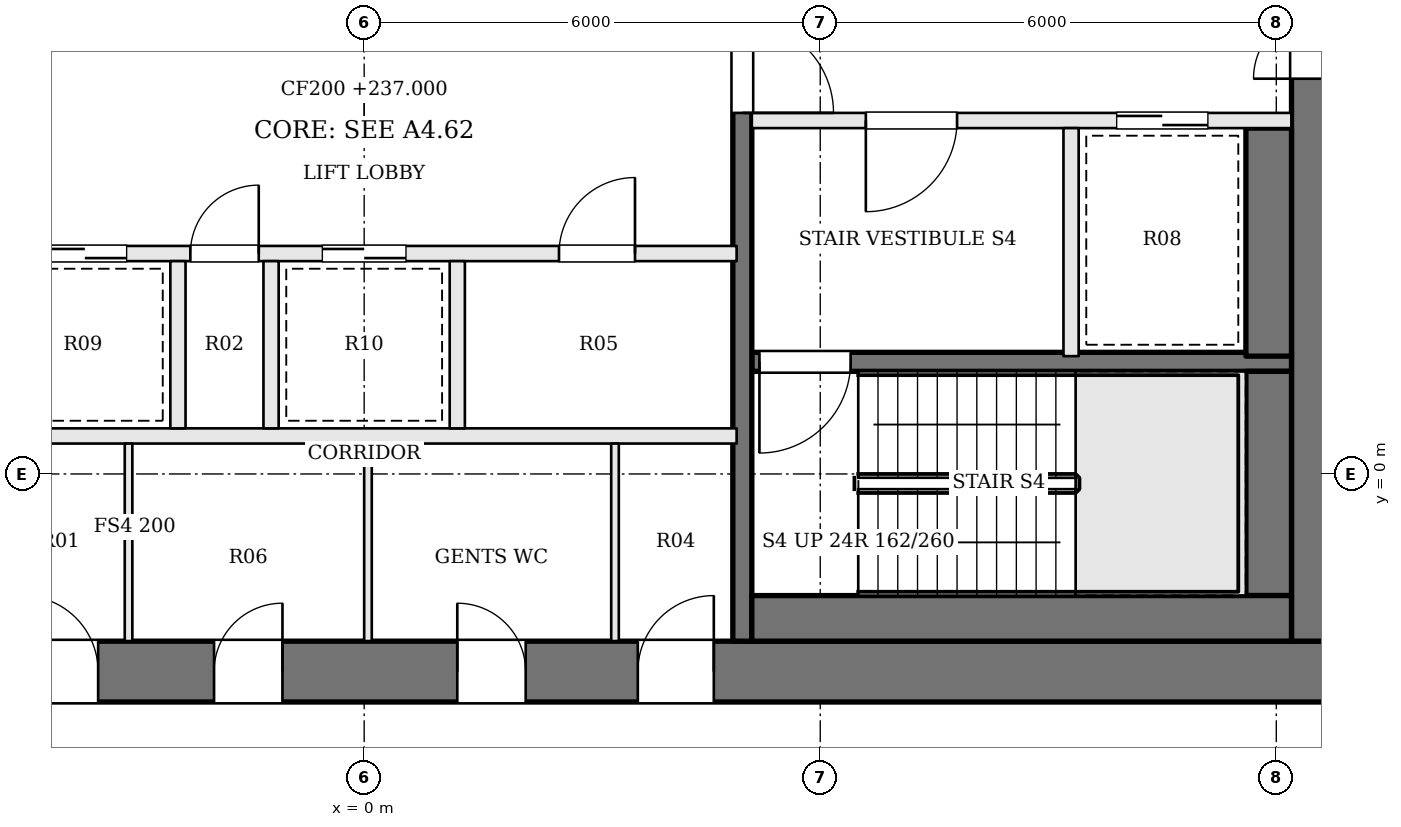
"""IFC4 building model, lengths in metres.
Left out: names, types, materials, properties, quantities, classifications, styles, units other than length and angle.
Written with IfcOpenShell. Run it as: python <this file> out.ifc"""

import sys

from ifc_helpers import new_model, si_unit, direction, frame, frame_2d, origin, place, context, subcontext, project, spatial, rectangle, extrude, element, fill, save


model = new_model("IFC4")
c1 = context("Model", 3, precision=1e-05, world=origin(), true_north=direction((0.0, 1.0)))
c2 = subcontext(c1, "Body", "Model", "MODEL_VIEW")
j1 = project(units=[si_unit("LENGTHUNIT", "METRE"), si_unit("PLANEANGLEUNIT", "RADIAN")], contexts=[c1])
p1 = place(None, origin())
s1 = spatial("IfcSite", under=j1, at=p1, CompositionType="ELEMENT")
p2 = place(p1, origin())
s2 = spatial("IfcBuilding", under=s1, at=p2, CompositionType="ELEMENT")
p3 = place(p2, frame((0.0, 0.0, 237.0)))
s3 = spatial("IfcBuildingStorey", under=s2, at=p3, CompositionType="ELEMENT", Elevation=237.0)
p4 = place(p3, frame((-13.0, -2.6, 0.0), z_axis=(0.0, 0.0, 1.0), x_axis=(1.0, 0.0, 0.0)))
e1 = element("IfcWall", 1, at=p4, inside=s3, PredefinedType="SHEAR", context=c2, shape_type="SweptSolid", body=[
    extrude(rectangle(XDim=26.0, YDim=0.8, at=frame_2d((13.0, 0.0))), origin(), (0.0, 0.0, 1.0), 3.9),
])
p5 = place(p4, frame((8.5, 0.0, 0.0)))
e2 = element("IfcOpeningElement", 2, at=p5, cuts=e1, PredefinedType="OPENING", context=c2, shape_type="SweptSolid", body=[
    extrude(rectangle(XDim=1.0, YDim=2.1, at=frame_2d((0.5, 1.05))), frame((0.0, 0.41, 0.0), z_axis=(0.0, -1.0, 0.0), x_axis=(1.0, 0.0, 0.0)), (0.0, 0.0, 1.0), 0.82),
])
p6 = place(p4, frame((11.025, 0.0, 0.0)))
e3 = element("IfcOpeningElement", 3, at=p6, cuts=e1, PredefinedType="OPENING", context=c2, shape_type="SweptSolid", body=[
    extrude(rectangle(XDim=0.9, YDim=2.1, at=frame_2d((0.45, 1.05))), frame((0.0, 0.41, 0.0), z_axis=(0.0, -1.0, 0.0), x_axis=(1.0, 0.0, 0.0)), (0.0, 0.0, 1.0), 0.82),
])
p7 = place(p4, frame((14.225, 0.0, 0.0)))
e4 = element("IfcOpeningElement", 4, at=p7, cuts=e1, PredefinedType="OPENING", context=c2, shape_type="SweptSolid", body=[
    extrude(rectangle(XDim=0.9, YDim=2.1, at=frame_2d((0.45, 1.05))), frame((0.0, 0.41, 0.0), z_axis=(0.0, -1.0, 0.0), x_axis=(1.0, 0.0, 0.0)), (0.0, 0.0, 1.0), 0.82),
])
p8 = place(p4, frame((16.6, 0.0, 0.0)))
e5 = element("IfcOpeningElement", 5, at=p8, cuts=e1, PredefinedType="OPENING", context=c2, shape_type="SweptSolid", body=[
    extrude(rectangle(XDim=1.0, YDim=2.1, at=frame_2d((0.5, 1.05))), frame((0.0, 0.41, 0.0), z_axis=(0.0, -1.0, 0.0), x_axis=(1.0, 0.0, 0.0)), (0.0, 0.0, 1.0), 0.82),
])
p9 = place(p3, frame((12.6, -2.2, 0.0), z_axis=(0.0, 0.0, 1.0), x_axis=(0.0, 1.0, 0.0)))
e6 = element("IfcWall", 6, at=p9, inside=s3, PredefinedType="SHEAR", context=c2, shape_type="SweptSolid", body=[
    extrude(rectangle(XDim=13.4, YDim=0.8, at=frame_2d((6.7, 0.0))), origin(), (0.0, 0.0, 1.0), 3.9),
])
p10 = place(p9, frame((7.4, 0.0, 0.0)))
e7 = element("IfcOpeningElement", 7, at=p10, cuts=e6, PredefinedType="OPENING", context=c2, shape_type="SweptSolid", body=[
    extrude(rectangle(XDim=1.8, YDim=2.1, at=frame_2d((0.9, 1.05))), frame((0.0, 0.41, 0.0), z_axis=(0.0, -1.0, 0.0), x_axis=(1.0, 0.0, 0.0)), (0.0, 0.0, 1.0), 0.82),
])
p11 = place(p3, frame((12.2, 4.65, 0.0), z_axis=(0.0, 0.0, 1.0), x_axis=(-1.0, 0.0, 0.0)))
e8 = element("IfcWall", 8, at=p11, inside=s3, PredefinedType="SOLIDWALL", context=c2, shape_type="SweptSolid", body=[
    extrude(rectangle(XDim=7.1, YDim=0.2, at=frame_2d((3.55, 0.0))), origin(), (0.0, 0.0, 1.0), 3.7),
])
p12 = place(p11, frame((4.4, 0.0, 0.0)))
e9 = element("IfcOpeningElement", 9, at=p12, cuts=e8, PredefinedType="OPENING", context=c2, shape_type="SweptSolid", body=[
    extrude(rectangle(XDim=1.2, YDim=2.1, at=frame_2d((0.6, 1.05))), frame((0.0, 0.11, 0.0), z_axis=(0.0, -1.0, 0.0), x_axis=(1.0, 0.0, 0.0)), (0.0, 0.0, 1.0), 0.22),
])
p13 = place(p11, frame((1.1, 0.0, 0.0)))
e10 = element("IfcOpeningElement", 10, at=p13, cuts=e8, PredefinedType="OPENING", context=c2, shape_type="SweptSolid", body=[
    extrude(rectangle(XDim=1.2, YDim=2.1, at=frame_2d((0.6, 1.05))), frame((0.0, 0.11, 0.0), z_axis=(0.0, -1.0, 0.0), x_axis=(1.0, 0.0, 0.0)), (0.0, 0.0, 1.0), 0.22),
])
p14 = place(p3, frame((12.2, 1.475, 0.0), z_axis=(0.0, 0.0, 1.0), x_axis=(-1.0, 0.0, 0.0)))
e11 = element("IfcWall", 11, at=p14, inside=s3, PredefinedType="SOLIDWALL", context=c2, shape_type="SweptSolid", body=[
    extrude(rectangle(XDim=7.1, YDim=0.25, at=frame_2d((3.55, 0.0))), origin(), (0.0, 0.0, 1.0), 3.7),
])
p15 = place(p14, frame((5.8, 0.0, 0.0)))
e12 = element("IfcOpeningElement", 12, at=p15, cuts=e11, PredefinedType="OPENING", context=c2, shape_type="SweptSolid", body=[
    extrude(rectangle(XDim=1.2, YDim=2.1, at=frame_2d((0.6, 1.05))), frame((0.0, 0.135, 0.0), z_axis=(0.0, -1.0, 0.0), x_axis=(1.0, 0.0, 0.0)), (0.0, 0.0, 1.0), 0.27),
])
p16 = place(p3, frame((9.3, 4.55, 0.0), z_axis=(0.0, 0.0, 1.0), x_axis=(0.0, -1.0, 0.0)))
e13 = element("IfcWall", 13, at=p16, inside=s3, PredefinedType="SOLIDWALL", context=c2, shape_type="SweptSolid", body=[
    extrude(rectangle(XDim=3.0, YDim=0.2, at=frame_2d((1.5, 0.0))), origin(), (0.0, 0.0, 1.0), 3.7),
])
p17 = place(p3, frame((4.975, 11.2, 0.0), z_axis=(0.0, 0.0, 1.0), x_axis=(0.0, -1.0, 0.0)))
e14 = element("IfcWall", 14, at=p17, inside=s3, PredefinedType="SOLIDWALL", context=c2, shape_type="SweptSolid", body=[
    extrude(rectangle(XDim=13.4, YDim=0.25, at=frame_2d((6.7, 0.0))), origin(), (0.0, 0.0, 1.0), 3.7),
])
p18 = place(p17, frame((5.25, 0.0, 0.0)))
e15 = element("IfcOpeningElement", 15, at=p18, cuts=e14, PredefinedType="OPENING", context=c2, shape_type="SweptSolid", body=[
    extrude(rectangle(XDim=1.2, YDim=2.1, at=frame_2d((0.6, 1.05))), frame((0.0, 0.135, 0.0), z_axis=(0.0, -1.0, 0.0), x_axis=(1.0, 0.0, 0.0)), (0.0, 0.0, 1.0), 0.27),
])
p19 = place(p3, frame((11.9, 4.55, 0.0), z_axis=(0.0, 0.0, 1.0), x_axis=(0.0, -1.0, 0.0)))
e16 = element("IfcWall", 16, at=p19, inside=s3, PredefinedType="SOLIDWALL", context=c2, shape_type="SweptSolid", body=[
    extrude(rectangle(XDim=3.0, YDim=0.6, at=frame_2d((1.5, 0.0))), origin(), (0.0, 0.0, 1.0), 3.7),
])
p20 = place(p3, frame((11.9, 1.35, 0.0), z_axis=(0.0, 0.0, 1.0), x_axis=(0.0, -1.0, 0.0)))
e17 = element("IfcWall", 17, at=p20, inside=s3, PredefinedType="SOLIDWALL", context=c2, shape_type="SweptSolid", body=[
    extrude(rectangle(XDim=2.95, YDim=0.6, at=frame_2d((1.475, 0.0))), origin(), (0.0, 0.0, 1.0), 3.7),
])
p21 = place(p3, frame((12.2, -1.9, 0.0), z_axis=(0.0, 0.0, 1.0), x_axis=(-1.0, 0.0, 0.0)))
e18 = element("IfcWall", 18, at=p21, inside=s3, PredefinedType="SOLIDWALL", context=c2, shape_type="SweptSolid", body=[
    extrude(rectangle(XDim=7.1, YDim=0.6, at=frame_2d((3.55, 0.0))), origin(), (0.0, 0.0, 1.0), 3.7),
])
p22 = place(p3, frame((-4.9, 0.5, 0.0), z_axis=(0.0, 0.0, 1.0), x_axis=(1.0, 0.0, 0.0)))
e19 = element("IfcWall", 19, at=p22, inside=s3, PredefinedType="SOLIDWALL", context=c2, shape_type="SweptSolid", body=[
    extrude(rectangle(XDim=9.8, YDim=0.2, at=frame_2d((4.9, 0.0))), origin(), (0.0, 0.0, 1.0), 3.7),
])
p23 = place(p3, frame((-4.9, 2.9, 0.0), z_axis=(0.0, 0.0, 1.0), x_axis=(1.0, 0.0, 0.0)))
e20 = element("IfcWall", 20, at=p23, inside=s3, PredefinedType="SOLIDWALL", context=c2, shape_type="SweptSolid", body=[
    extrude(rectangle(XDim=9.8, YDim=0.2, at=frame_2d((4.9, 0.0))), origin(), (0.0, 0.0, 1.0), 3.7),
])
p24 = place(p23, frame((0.675, 0.0, 0.0)))
e21 = element("IfcOpeningElement", 21, at=p24, cuts=e20, PredefinedType="OPENING", context=c2, shape_type="SweptSolid", body=[
    extrude(rectangle(XDim=1.1, YDim=2.1, at=frame_2d((0.55, 1.05))), frame((0.0, 0.11, 0.0), z_axis=(0.0, -1.0, 0.0), x_axis=(1.0, 0.0, 0.0)), (0.0, 0.0, 1.0), 0.22),
])
p25 = place(p23, frame((2.613, 0.0, 0.0)))
e22 = element("IfcOpeningElement", 22, at=p25, cuts=e20, PredefinedType="OPENING", context=c2, shape_type="SweptSolid", body=[
    extrude(rectangle(XDim=0.9, YDim=2.1, at=frame_2d((0.45, 1.05))), frame((0.0, 0.11, 0.0), z_axis=(0.0, -1.0, 0.0), x_axis=(1.0, 0.0, 0.0)), (0.0, 0.0, 1.0), 0.22),
])
p26 = place(p23, frame((4.35, 0.0, 0.0)))
e23 = element("IfcOpeningElement", 23, at=p26, cuts=e20, PredefinedType="OPENING", context=c2, shape_type="SweptSolid", body=[
    extrude(rectangle(XDim=1.1, YDim=2.1, at=frame_2d((0.55, 1.05))), frame((0.0, 0.11, 0.0), z_axis=(0.0, -1.0, 0.0), x_axis=(1.0, 0.0, 0.0)), (0.0, 0.0, 1.0), 0.22),
])
p27 = place(p23, frame((7.463, 0.0, 0.0)))
e24 = element("IfcOpeningElement", 24, at=p27, cuts=e20, PredefinedType="OPENING", context=c2, shape_type="SweptSolid", body=[
    extrude(rectangle(XDim=1.0, YDim=2.1, at=frame_2d((0.5, 1.05))), frame((0.0, 0.11, 0.0), z_axis=(0.0, -1.0, 0.0), x_axis=(1.0, 0.0, 0.0)), (0.0, 0.0, 1.0), 0.22),
])
for number, where, z_axis, x_axis in (
    (25, (-2.45, 0.6, 0.0), (0.0, 0.0, 1.0), (0.0, 1.0, 0.0)),
    (26, (-1.225, 0.6, 0.0), (0.0, 0.0, 1.0), (0.0, 1.0, 0.0)),
    (27, (1.225, 0.6, 0.0), (0.0, 0.0, 1.0), (0.0, 1.0, 0.0)),
):
    element("IfcWall", number, at=place(p3, frame(where, z_axis=z_axis, x_axis=x_axis)), inside=s3, PredefinedType="SOLIDWALL", context=c2, shape_type="SweptSolid", body=[
        extrude(rectangle(XDim=2.2, YDim=0.2, at=frame_2d((1.1, 0.0))), origin(), (0.0, 0.0, 1.0), 3.7),
    ])
for number, where, z_axis, x_axis in (
    (28, (-3.1, -2.2, 0.0), (0.0, 0.0, 1.0), (0.0, 1.0, 0.0)),
    (29, (0.05, -2.2, 0.0), (0.0, 0.0, 1.0), (0.0, 1.0, 0.0)),
    (30, (3.3, -2.2, 0.0), (0.0, 0.0, 1.0), (0.0, 1.0, 0.0)),
):
    element("IfcWall", number, at=place(p3, frame(where, z_axis=z_axis, x_axis=x_axis)), inside=s3, PredefinedType="PARTITIONING", context=c2, shape_type="SweptSolid", body=[
        extrude(rectangle(XDim=2.6, YDim=0.1, at=frame_2d((1.3, 0.0))), origin(), (0.0, 0.0, 1.0), 3.7),
    ])
p28 = place(p10, origin())
e31 = element("IfcDoor", 31, at=p28, inside=s3, OperationType="DOUBLE_DOOR_SINGLE_SWING", PredefinedType="DOOR", context=c2, shape_type="SweptSolid", body=[
    extrude(rectangle(XDim=1.8, YDim=2.1, at=frame_2d((0.9, 1.05))), frame((0.0, 0.025, 0.0), z_axis=(0.0, -1.0, 0.0), x_axis=(1.0, 0.0, 0.0)), (0.0, 0.0, 1.0), 0.05),
])
fill(e7, e31)
p29 = place(p18, origin())
e32 = element("IfcDoor", 32, at=p29, inside=s3, OperationType="SINGLE_SWING_RIGHT", PredefinedType="DOOR", context=c2, shape_type="SweptSolid", body=[
    extrude(rectangle(XDim=1.2, YDim=2.1, at=frame_2d((0.6, 1.05))), frame((0.0, 0.025, 0.0), z_axis=(0.0, -1.0, 0.0), x_axis=(1.0, 0.0, 0.0)), (0.0, 0.0, 1.0), 0.05),
])
fill(e15, e32)
p30 = place(p12, origin())
e33 = element("IfcDoor", 33, at=p30, inside=s3, OperationType="SINGLE_SWING_RIGHT", PredefinedType="DOOR", context=c2, shape_type="SweptSolid", body=[
    extrude(rectangle(XDim=1.2, YDim=2.1, at=frame_2d((0.6, 1.05))), frame((0.0, 0.025, 0.0), z_axis=(0.0, -1.0, 0.0), x_axis=(1.0, 0.0, 0.0)), (0.0, 0.0, 1.0), 0.05),
])
fill(e9, e33)
p31 = place(p15, origin())
e34 = element("IfcDoor", 34, at=p31, inside=s3, OperationType="SINGLE_SWING_RIGHT", PredefinedType="DOOR", context=c2, shape_type="SweptSolid", body=[
    extrude(rectangle(XDim=1.2, YDim=2.1, at=frame_2d((0.6, 1.05))), frame((0.0, 0.025, 0.0), z_axis=(0.0, -1.0, 0.0), x_axis=(1.0, 0.0, 0.0)), (0.0, 0.0, 1.0), 0.05),
])
fill(e12, e34)
p32 = place(p13, origin())
e35 = element("IfcDoor", 35, at=p32, inside=s3, OperationType="SLIDING_TO_RIGHT", PredefinedType="DOOR", context=c2, shape_type="SweptSolid", body=[
    extrude(rectangle(XDim=1.2, YDim=2.1, at=frame_2d((0.6, 1.05))), frame((0.0, 0.025, 0.0), z_axis=(0.0, -1.0, 0.0), x_axis=(1.0, 0.0, 0.0)), (0.0, 0.0, 1.0), 0.05),
])
fill(e10, e35)
p33 = place(p24, origin())
e36 = element("IfcDoor", 36, at=p33, inside=s3, OperationType="SLIDING_TO_RIGHT", PredefinedType="DOOR", context=c2, shape_type="SweptSolid", body=[
    extrude(rectangle(XDim=1.1, YDim=2.1, at=frame_2d((0.55, 1.05))), frame((0.0, 0.025, 0.0), z_axis=(0.0, -1.0, 0.0), x_axis=(1.0, 0.0, 0.0)), (0.0, 0.0, 1.0), 0.05),
])
fill(e21, e36)
p34 = place(p25, origin())
e37 = element("IfcDoor", 37, at=p34, inside=s3, OperationType="SINGLE_SWING_RIGHT", PredefinedType="DOOR", context=c2, shape_type="SweptSolid", body=[
    extrude(rectangle(XDim=0.9, YDim=2.1, at=frame_2d((0.45, 1.05))), frame((0.0, 0.025, 0.0), z_axis=(0.0, -1.0, 0.0), x_axis=(1.0, 0.0, 0.0)), (0.0, 0.0, 1.0), 0.05),
])
fill(e22, e37)
p35 = place(p26, origin())
e38 = element("IfcDoor", 38, at=p35, inside=s3, OperationType="SLIDING_TO_LEFT", PredefinedType="DOOR", context=c2, shape_type="SweptSolid", body=[
    extrude(rectangle(XDim=1.1, YDim=2.1, at=frame_2d((0.55, 1.05))), frame((0.0, 0.025, 0.0), z_axis=(0.0, -1.0, 0.0), x_axis=(1.0, 0.0, 0.0)), (0.0, 0.0, 1.0), 0.05),
])
fill(e23, e38)
p36 = place(p27, origin())
e39 = element("IfcDoor", 39, at=p36, inside=s3, OperationType="SINGLE_SWING_RIGHT", PredefinedType="DOOR", context=c2, shape_type="SweptSolid", body=[
    extrude(rectangle(XDim=1.0, YDim=2.1, at=frame_2d((0.5, 1.05))), frame((0.0, 0.025, 0.0), z_axis=(0.0, -1.0, 0.0), x_axis=(1.0, 0.0, 0.0)), (0.0, 0.0, 1.0), 0.05),
])
fill(e24, e39)
p37 = place(p5, origin())
e40 = element("IfcDoor", 40, at=p37, inside=s3, OperationType="SINGLE_SWING_LEFT", PredefinedType="DOOR", context=c2, shape_type="SweptSolid", body=[
    extrude(rectangle(XDim=1.0, YDim=2.1, at=frame_2d((0.5, 1.05))), frame((0.0, 0.025, 0.0), z_axis=(0.0, -1.0, 0.0), x_axis=(1.0, 0.0, 0.0)), (0.0, 0.0, 1.0), 0.05),
])
fill(e2, e40)
p38 = place(p6, origin())
e41 = element("IfcDoor", 41, at=p38, inside=s3, OperationType="SINGLE_SWING_RIGHT", PredefinedType="DOOR", context=c2, shape_type="SweptSolid", body=[
    extrude(rectangle(XDim=0.9, YDim=2.1, at=frame_2d((0.45, 1.05))), frame((0.0, 0.025, 0.0), z_axis=(0.0, -1.0, 0.0), x_axis=(1.0, 0.0, 0.0)), (0.0, 0.0, 1.0), 0.05),
])
fill(e3, e41)
p39 = place(p7, origin())
e42 = element("IfcDoor", 42, at=p39, inside=s3, OperationType="SINGLE_SWING_LEFT", PredefinedType="DOOR", context=c2, shape_type="SweptSolid", body=[
    extrude(rectangle(XDim=0.9, YDim=2.1, at=frame_2d((0.45, 1.05))), frame((0.0, 0.025, 0.0), z_axis=(0.0, -1.0, 0.0), x_axis=(1.0, 0.0, 0.0)), (0.0, 0.0, 1.0), 0.05),
])
fill(e4, e42)
p40 = place(p8, origin())
e43 = element("IfcDoor", 43, at=p40, inside=s3, OperationType="SINGLE_SWING_RIGHT", PredefinedType="DOOR", context=c2, shape_type="SweptSolid", body=[
    extrude(rectangle(XDim=1.0, YDim=2.1, at=frame_2d((0.5, 1.05))), frame((0.0, 0.025, 0.0), z_axis=(0.0, -1.0, 0.0), x_axis=(1.0, 0.0, 0.0)), (0.0, 0.0, 1.0), 0.05),
])
fill(e5, e43)
save(model, sys.argv[1])
